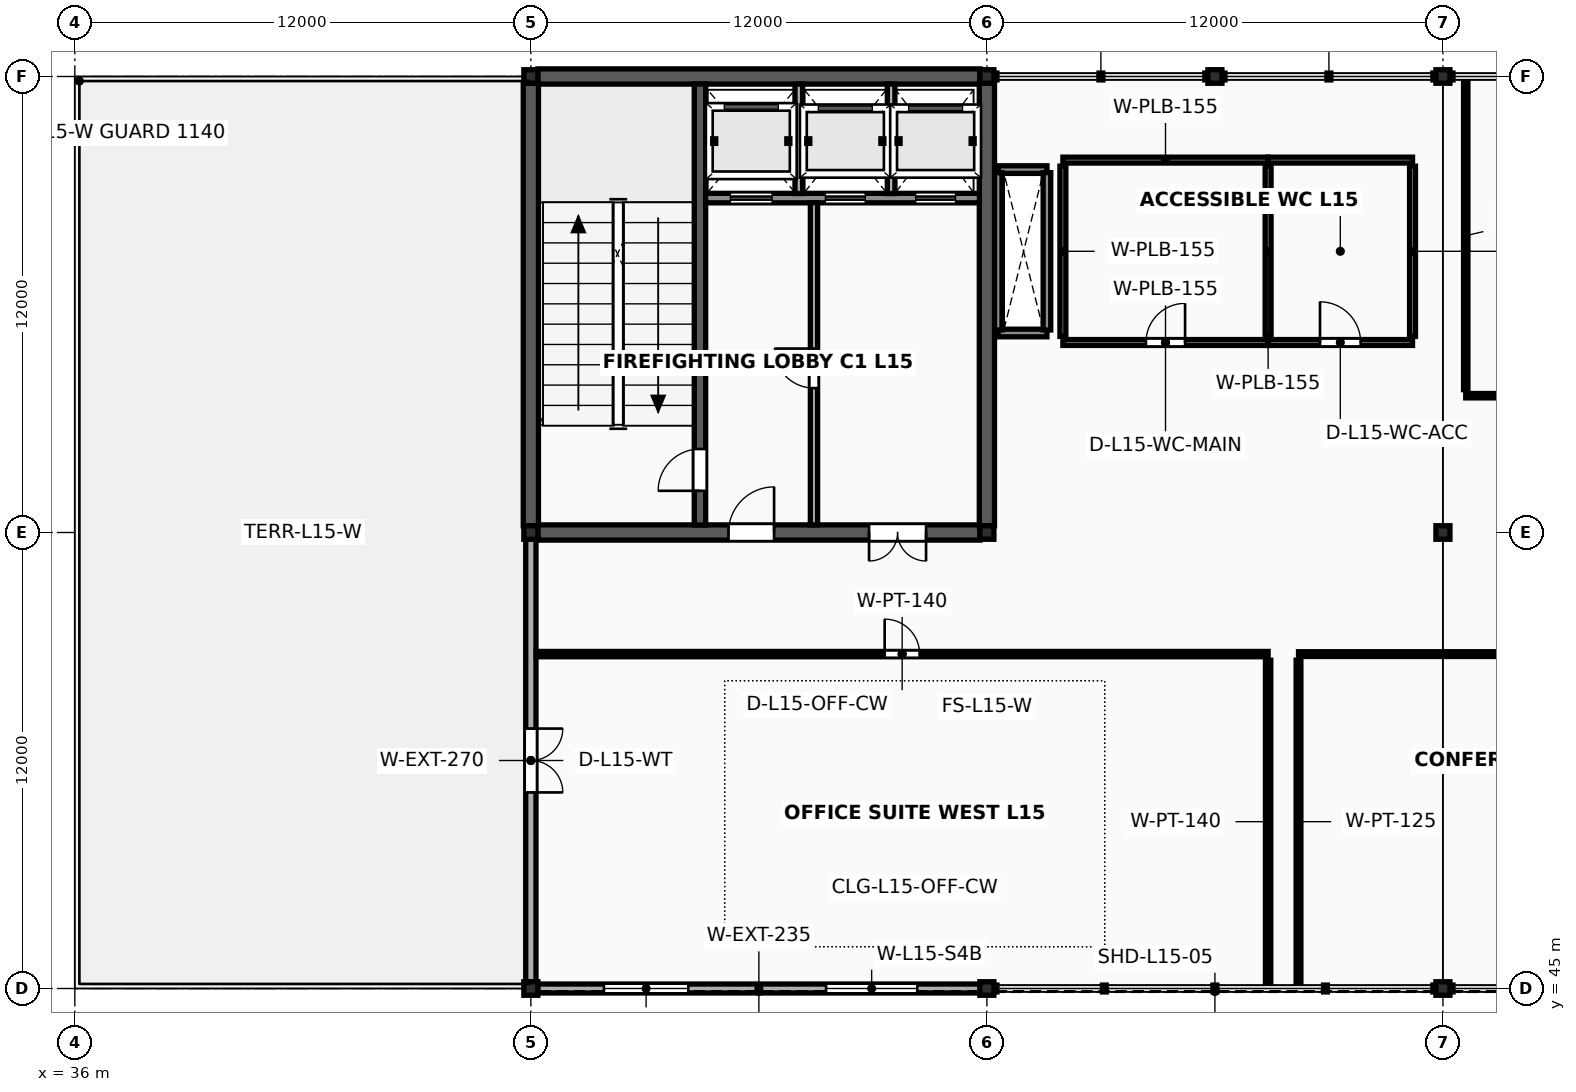
"""IFC4 building model, lengths in metres.
Left out: names, types, materials, properties, quantities, classifications, styles, units other than length and angle.
Written with IfcOpenShell. Run it as: python <this file> out.ifc"""

import sys

from ifc_helpers import new_model, si_unit, direction, frame, frame_2d, origin, origin_2d, place, context, subcontext, project, spatial, rectangle, i_section, extrude, element, fill, save


model = new_model("IFC4")
c1 = context("Model", 3, precision=1e-05, world=origin(), true_north=direction((0.0, 1.0)))
c2 = subcontext(c1, "Body", "Model", "MODEL_VIEW")
j1 = project(units=[si_unit("LENGTHUNIT", "METRE"), si_unit("PLANEANGLEUNIT", "RADIAN")], contexts=[c1])
p1 = place(None, origin())
s1 = spatial("IfcSite", under=j1, at=p1, CompositionType="ELEMENT")
p2 = place(p1, origin())
s2 = spatial("IfcBuilding", under=s1, at=p2, CompositionType="ELEMENT")
p3 = place(p2, frame((0.0, 0.0, 61.6)))
s3 = spatial("IfcBuildingStorey", under=s2, at=p3, CompositionType="ELEMENT", Elevation=61.6)
for number, where, z_axis, x_axis in (
    (1, (48.0, 45.0, 0.0), (0.0, 0.0, 1.0), (1.0, 0.0, 0.0)),
    (2, (48.0, 57.0, 0.0), (0.0, 0.0, 1.0), (1.0, 0.0, 0.0)),
    (3, (48.0, 69.0, 0.0), (0.0, 0.0, 1.0), (1.0, 0.0, 0.0)),
    (4, (60.0, 45.0, 0.0), (0.0, 0.0, 1.0), (1.0, 0.0, 0.0)),
    (5, (60.0, 57.0, 0.0), (0.0, 0.0, 1.0), (1.0, 0.0, 0.0)),
    (6, (60.0, 69.0, 0.0), (0.0, 0.0, 1.0), (1.0, 0.0, 0.0)),
    (7, (72.0, 45.0, 0.0), (0.0, 0.0, 1.0), (1.0, 0.0, 0.0)),
    (8, (72.0, 57.0, 0.0), (0.0, 0.0, 1.0), (1.0, 0.0, 0.0)),
    (9, (72.0, 69.0, 0.0), (0.0, 0.0, 1.0), (1.0, 0.0, 0.0)),
    (10, (66.0, 69.0, 0.0), (0.0, 0.0, 1.0), (1.0, 0.0, 0.0)),
):
    element("IfcColumn", number, at=place(p3, frame(where, z_axis=z_axis, x_axis=x_axis)), inside=s3, PredefinedType="COLUMN", context=c2, shape_type="SweptSolid", body=[
        extrude(i_section(OverallWidth=0.369, OverallDepth=0.356, WebThickness=0.011, FlangeThickness=0.018, FilletRadius=0.018, at=origin_2d()), origin(), (0.0, 0.0, 1.0), 4.0),
    ])
for number, where, z_axis, x_axis in (
    (11, (60.297, 62.25, 0.0), (0.0, 0.0, 1.0), (1.0, 0.0, 0.0)),
    (12, (60.297, 66.55, 0.0), (0.0, 0.0, 1.0), (1.0, 0.0, 0.0)),
):
    element("IfcWall", number, at=place(p3, frame(where, z_axis=z_axis, x_axis=x_axis)), inside=s3, PredefinedType="SOLIDWALL", context=c2, shape_type="SweptSolid", body=[
        extrude(rectangle(XDim=1.283, YDim=0.2, at=frame_2d((0.642, 0.0))), origin(), (0.0, 0.0, 1.0), 3.843),
    ])
for number, where, z_axis, x_axis in (
    (13, (60.297, 62.33, 0.0), (0.0, 0.0, 1.0), (0.0, 1.0, 0.0)),
    (14, (61.58, 62.33, 0.0), (0.0, 0.0, 1.0), (0.0, 1.0, 0.0)),
):
    element("IfcWall", number, at=place(p3, frame(where, z_axis=z_axis, x_axis=x_axis)), inside=s3, PredefinedType="SOLIDWALL", context=c2, shape_type="SweptSolid", body=[
        extrude(rectangle(XDim=4.14, YDim=0.2, at=frame_2d((2.07, 0.0))), origin(), (0.0, 0.0, 1.0), 3.843),
    ])
p4 = place(p3, frame((48.181, 57.0, 0.0), z_axis=(0.0, 0.0, 1.0), x_axis=(1.0, 0.0, 0.0)))
e15 = element("IfcWall", 15, at=p4, inside=s3, PredefinedType="SHEAR", context=c2, shape_type="SweptSolid", body=[
    extrude(rectangle(XDim=11.637, YDim=0.4, at=frame_2d((5.819, 0.0))), origin(), (0.0, 0.0, 1.0), 3.843),
])
p5 = place(p4, frame((5.019, 0.0, 0.0)))
e16 = element("IfcOpeningElement", 16, at=p5, cuts=e15, PredefinedType="OPENING", context=c2, shape_type="SweptSolid", body=[
    extrude(rectangle(XDim=1.2, YDim=2.2, at=frame_2d((0.6, 1.1))), frame((0.0, 0.215, 0.0), z_axis=(0.0, -1.0, 0.0), x_axis=(1.0, 0.0, 0.0)), (0.0, 0.0, 1.0), 0.43),
])
p6 = place(p4, frame((8.718, 0.0, 0.0)))
e17 = element("IfcOpeningElement", 17, at=p6, cuts=e15, PredefinedType="OPENING", context=c2, shape_type="SweptSolid", body=[
    extrude(rectangle(XDim=1.5, YDim=2.25, at=frame_2d((0.75, 1.125))), frame((0.0, 0.215, 0.0), z_axis=(0.0, -1.0, 0.0), x_axis=(1.0, 0.0, 0.0)), (0.0, 0.0, 1.0), 0.43),
])
p7 = place(p3, frame((48.181, 69.0, 0.0), z_axis=(0.0, 0.0, 1.0), x_axis=(1.0, 0.0, 0.0)))
e18 = element("IfcWall", 18, at=p7, inside=s3, PredefinedType="SHEAR", context=c2, shape_type="SweptSolid", body=[
    extrude(rectangle(XDim=11.637, YDim=0.4, at=frame_2d((5.819, 0.0))), origin(), (0.0, 0.0, 1.0), 3.843),
])
for number, where, z_axis, x_axis in (
    (19, (48.0, 57.175, 0.0), (0.0, 0.0, 1.0), (0.0, 1.0, 0.0)),
    (20, (60.0, 57.175, 0.0), (0.0, 0.0, 1.0), (0.0, 1.0, 0.0)),
):
    element("IfcWall", number, at=place(p3, frame(where, z_axis=z_axis, x_axis=x_axis)), inside=s3, PredefinedType="SHEAR", context=c2, shape_type="SweptSolid", body=[
        extrude(rectangle(XDim=11.65, YDim=0.4, at=frame_2d((5.825, 0.0))), origin(), (0.0, 0.0, 1.0), 3.843),
    ])
p8 = place(p3, frame((52.45, 57.197, 0.0), z_axis=(0.0, 0.0, 1.0), x_axis=(0.0, 1.0, 0.0)))
e21 = element("IfcWall", 21, at=p8, inside=s3, PredefinedType="SHEAR", context=c2, shape_type="SweptSolid", body=[
    extrude(rectangle(XDim=11.606, YDim=0.3, at=frame_2d((5.803, 0.0))), origin(), (0.0, 0.0, 1.0), 3.843),
])
p9 = place(p8, frame((0.9, 0.0, 0.0)))
e22 = element("IfcOpeningElement", 22, at=p9, cuts=e21, PredefinedType="OPENING", context=c2, shape_type="SweptSolid", body=[
    extrude(rectangle(XDim=1.1, YDim=2.2, at=frame_2d((0.55, 1.1))), frame((0.0, 0.165, 0.0), z_axis=(0.0, -1.0, 0.0), x_axis=(1.0, 0.0, 0.0)), (0.0, 0.0, 1.0), 0.33),
])
p10 = place(p3, frame((52.597, 65.8, 0.0), z_axis=(0.0, 0.0, 1.0), x_axis=(1.0, 0.0, 0.0)))
e23 = element("IfcWall", 23, at=p10, inside=s3, PredefinedType="SOLIDWALL", context=c2, shape_type="SweptSolid", body=[
    extrude(rectangle(XDim=7.206, YDim=0.25, at=frame_2d((3.603, 0.0))), origin(), (0.0, 0.0, 1.0), 3.843),
])
p11 = place(p10, frame((0.653, 0.0, 0.0)))
e24 = element("IfcOpeningElement", 24, at=p11, cuts=e23, PredefinedType="OPENING", context=c2, shape_type="SweptSolid", body=[
    extrude(rectangle(XDim=1.1, YDim=2.24, at=frame_2d((0.55, 1.12))), frame((0.0, 0.14, 0.0), z_axis=(0.0, -1.0, 0.0), x_axis=(1.0, 0.0, 0.0)), (0.0, 0.0, 1.0), 0.28),
])
p12 = place(p10, frame((3.153, 0.0, 0.0)))
e25 = element("IfcOpeningElement", 25, at=p12, cuts=e23, PredefinedType="OPENING", context=c2, shape_type="SweptSolid", body=[
    extrude(rectangle(XDim=1.05, YDim=2.2, at=frame_2d((0.525, 1.1))), frame((0.0, 0.14, 0.0), z_axis=(0.0, -1.0, 0.0), x_axis=(1.0, 0.0, 0.0)), (0.0, 0.0, 1.0), 0.28),
])
p13 = place(p10, frame((5.528, 0.0, 0.0)))
e26 = element("IfcOpeningElement", 26, at=p13, cuts=e23, PredefinedType="OPENING", context=c2, shape_type="SweptSolid", body=[
    extrude(rectangle(XDim=1.05, YDim=2.2, at=frame_2d((0.525, 1.1))), frame((0.0, 0.14, 0.0), z_axis=(0.0, -1.0, 0.0), x_axis=(1.0, 0.0, 0.0)), (0.0, 0.0, 1.0), 0.28),
])
for number, where, z_axis, x_axis in (
    (27, (55.05, 65.92, 0.0), (0.0, 0.0, 1.0), (0.0, 1.0, 0.0)),
    (28, (57.48, 65.92, 0.0), (0.0, 0.0, 1.0), (0.0, 1.0, 0.0)),
):
    element("IfcWall", number, at=place(p3, frame(where, z_axis=z_axis, x_axis=x_axis)), inside=s3, PredefinedType="SOLIDWALL", context=c2, shape_type="SweptSolid", body=[
        extrude(rectangle(XDim=2.88, YDim=0.2, at=frame_2d((1.44, 0.0))), origin(), (0.0, 0.0, 1.0), 3.833),
    ])
p14 = place(p3, frame((55.45, 57.2, 0.0), z_axis=(0.0, 0.0, 1.0), x_axis=(0.0, 1.0, 0.0)))
e29 = element("IfcWall", 29, at=p14, inside=s3, PredefinedType="SOLIDWALL", context=c2, shape_type="SweptSolid", body=[
    extrude(rectangle(XDim=8.48, YDim=0.19, at=frame_2d((4.24, 0.0))), origin(), (0.0, 0.0, 1.0), 3.833),
])
p15 = place(p14, frame((3.6, 0.0, 0.0)))
e30 = element("IfcOpeningElement", 30, at=p15, cuts=e29, PredefinedType="OPENING", context=c2, shape_type="SweptSolid", body=[
    extrude(rectangle(XDim=1.04, YDim=2.18, at=frame_2d((0.52, 1.09))), frame((0.0, 0.11, 0.0), z_axis=(0.0, -1.0, 0.0), x_axis=(1.0, 0.0, 0.0)), (0.0, 0.0, 1.0), 0.22),
])
p16 = place(p3, frame((48.183, 45.0, 0.0), z_axis=(0.0, 0.0, 1.0), x_axis=(1.0, 0.0, 0.0)))
e31 = element("IfcWall", 31, at=p16, inside=s3, PredefinedType="SOLIDWALL", context=c2, shape_type="SweptSolid", body=[
    extrude(rectangle(XDim=11.635, YDim=0.235, at=frame_2d((5.817, 0.0))), origin(), (0.0, 0.0, 1.0), 3.296),
])
p17 = place(p16, frame((1.74, 0.0, 0.78)))
e32 = element("IfcOpeningElement", 32, at=p17, cuts=e31, PredefinedType="OPENING", context=c2, shape_type="SweptSolid", body=[
    extrude(rectangle(XDim=2.22, YDim=1.74, at=frame_2d((1.11, 0.87))), frame((0.0, 0.133, 0.0), z_axis=(0.0, -1.0, 0.0), x_axis=(1.0, 0.0, 0.0)), (0.0, 0.0, 1.0), 0.265),
])
p18 = place(p16, frame((7.585, 0.0, 0.78)))
e33 = element("IfcOpeningElement", 33, at=p18, cuts=e31, PredefinedType="OPENING", context=c2, shape_type="SweptSolid", body=[
    extrude(rectangle(XDim=2.4, YDim=1.74, at=frame_2d((1.2, 0.87))), frame((0.0, 0.133, 0.0), z_axis=(0.0, -1.0, 0.0), x_axis=(1.0, 0.0, 0.0)), (0.0, 0.0, 1.0), 0.265),
])
p19 = place(p3, frame((48.0, 45.176, 0.0), z_axis=(0.0, 0.0, 1.0), x_axis=(0.0, 1.0, 0.0)))
e34 = element("IfcWall", 34, at=p19, inside=s3, PredefinedType="SOLIDWALL", context=c2, shape_type="SweptSolid", body=[
    extrude(rectangle(XDim=11.648, YDim=0.27, at=frame_2d((5.824, 0.0))), origin(), (0.0, 0.0, 1.0), 3.296),
])
p20 = place(p19, frame((4.984, 0.0, 0.0)))
e35 = element("IfcOpeningElement", 35, at=p20, cuts=e34, PredefinedType="OPENING", context=c2, shape_type="SweptSolid", body=[
    extrude(rectangle(XDim=1.68, YDim=2.34, at=frame_2d((0.84, 1.17))), frame((0.0, 0.15, 0.0), z_axis=(0.0, -1.0, 0.0), x_axis=(1.0, 0.0, 0.0)), (0.0, 0.0, 1.0), 0.3),
])
p21 = place(p3, frame((62.0, 62.0, 0.0), z_axis=(0.0, 0.0, 1.0), x_axis=(1.0, 0.0, 0.0)))
e36 = element("IfcWall", 36, at=p21, inside=s3, PredefinedType="PLUMBINGWALL", context=c2, shape_type="SweptSolid", body=[
    extrude(rectangle(XDim=5.4, YDim=0.155, at=frame_2d((2.7, 0.0))), origin(), (0.0, 0.0, 1.0), 2.88),
])
p22 = place(p21, frame((2.185, 0.0, 0.0)))
e37 = element("IfcOpeningElement", 37, at=p22, cuts=e36, PredefinedType="OPENING", context=c2, shape_type="SweptSolid", body=[
    extrude(rectangle(XDim=1.03, YDim=2.17, at=frame_2d((0.515, 1.085))), frame((0.0, 0.093, 0.0), z_axis=(0.0, -1.0, 0.0), x_axis=(1.0, 0.0, 0.0)), (0.0, 0.0, 1.0), 0.185),
])
p23 = place(p3, frame((62.0, 66.8, 0.0), z_axis=(0.0, 0.0, 1.0), x_axis=(1.0, 0.0, 0.0)))
e38 = element("IfcWall", 38, at=p23, inside=s3, PredefinedType="PLUMBINGWALL", context=c2, shape_type="SweptSolid", body=[
    extrude(rectangle(XDim=5.4, YDim=0.155, at=frame_2d((2.7, 0.0))), origin(), (0.0, 0.0, 1.0), 2.88),
])
for number, where, z_axis, x_axis in (
    (39, (62.0, 62.16, 0.0), (0.0, 0.0, 1.0), (0.0, 1.0, 0.0)),
    (40, (67.4, 62.16, 0.0), (0.0, 0.0, 1.0), (0.0, 1.0, 0.0)),
):
    element("IfcWall", number, at=place(p3, frame(where, z_axis=z_axis, x_axis=x_axis)), inside=s3, PredefinedType="PLUMBINGWALL", context=c2, shape_type="SweptSolid", body=[
        extrude(rectangle(XDim=4.48, YDim=0.155, at=frame_2d((2.24, 0.0))), origin(), (0.0, 0.0, 1.0), 2.88),
    ])
p24 = place(p3, frame((67.4, 62.0, 0.0), z_axis=(0.0, 0.0, 1.0), x_axis=(1.0, 0.0, 0.0)))
e41 = element("IfcWall", 41, at=p24, inside=s3, PredefinedType="PLUMBINGWALL", context=c2, shape_type="SweptSolid", body=[
    extrude(rectangle(XDim=3.8, YDim=0.155, at=frame_2d((1.9, 0.0))), origin(), (0.0, 0.0, 1.0), 2.88),
])
p25 = place(p24, frame((1.365, 0.0, 0.0)))
e42 = element("IfcOpeningElement", 42, at=p25, cuts=e41, PredefinedType="OPENING", context=c2, shape_type="SweptSolid", body=[
    extrude(rectangle(XDim=1.07, YDim=2.19, at=frame_2d((0.535, 1.095))), frame((0.0, 0.093, 0.0), z_axis=(0.0, -1.0, 0.0), x_axis=(1.0, 0.0, 0.0)), (0.0, 0.0, 1.0), 0.185),
])
p26 = place(p3, frame((67.4, 66.8, 0.0), z_axis=(0.0, 0.0, 1.0), x_axis=(1.0, 0.0, 0.0)))
e43 = element("IfcWall", 43, at=p26, inside=s3, PredefinedType="PLUMBINGWALL", context=c2, shape_type="SweptSolid", body=[
    extrude(rectangle(XDim=3.8, YDim=0.155, at=frame_2d((1.9, 0.0))), origin(), (0.0, 0.0, 1.0), 2.88),
])
p27 = place(p3, frame((71.2, 62.16, 0.0), z_axis=(0.0, 0.0, 1.0), x_axis=(0.0, 1.0, 0.0)))
e44 = element("IfcWall", 44, at=p27, inside=s3, PredefinedType="PLUMBINGWALL", context=c2, shape_type="SweptSolid", body=[
    extrude(rectangle(XDim=4.48, YDim=0.155, at=frame_2d((2.24, 0.0))), origin(), (0.0, 0.0, 1.0), 2.88),
])
p28 = place(p3, frame((48.14, 53.8, 0.0), z_axis=(0.0, 0.0, 1.0), x_axis=(1.0, 0.0, 0.0)))
e45 = element("IfcWall", 45, at=p28, inside=s3, PredefinedType="PARTITIONING", context=c2, shape_type="SweptSolid", body=[
    extrude(rectangle(XDim=19.26, YDim=0.14, at=frame_2d((9.63, 0.0))), origin(), (0.0, 0.0, 1.0), 2.88),
])
p29 = place(p28, frame((9.17, 0.0, 0.0)))
e46 = element("IfcOpeningElement", 46, at=p29, cuts=e45, PredefinedType="OPENING", context=c2, shape_type="SweptSolid", body=[
    extrude(rectangle(XDim=0.92, YDim=2.1, at=frame_2d((0.46, 1.05))), frame((0.0, 0.085, 0.0), z_axis=(0.0, -1.0, 0.0), x_axis=(1.0, 0.0, 0.0)), (0.0, 0.0, 1.0), 0.17),
])
p30 = place(p3, frame((67.4, 45.14, 0.0), z_axis=(0.0, 0.0, 1.0), x_axis=(0.0, 1.0, 0.0)))
e47 = element("IfcWall", 47, at=p30, inside=s3, PredefinedType="PARTITIONING", context=c2, shape_type="SweptSolid", body=[
    extrude(rectangle(XDim=8.5, YDim=0.14, at=frame_2d((4.25, 0.0))), origin(), (0.0, 0.0, 1.0), 2.88),
])
p31 = place(p3, frame((68.2, 53.8, 0.0), z_axis=(0.0, 0.0, 1.0), x_axis=(1.0, 0.0, 0.0)))
e48 = element("IfcWall", 48, at=p31, inside=s3, PredefinedType="PARTITIONING", context=c2, shape_type="SweptSolid", body=[
    extrude(rectangle(XDim=15.2, YDim=0.125, at=frame_2d((7.6, 0.0))), origin(), (0.0, 0.0, 1.0), 2.88),
])
p32 = place(p31, frame((6.855, 0.0, 0.0)))
e49 = element("IfcOpeningElement", 49, at=p32, cuts=e48, PredefinedType="OPENING", context=c2, shape_type="SweptSolid", body=[
    extrude(rectangle(XDim=1.49, YDim=2.28, at=frame_2d((0.745, 1.14))), frame((0.0, 0.077, 0.0), z_axis=(0.0, -1.0, 0.0), x_axis=(1.0, 0.0, 0.0)), (0.0, 0.0, 1.0), 0.155),
])
p33 = place(p3, frame((68.2, 45.14, 0.0), z_axis=(0.0, 0.0, 1.0), x_axis=(0.0, 1.0, 0.0)))
e50 = element("IfcWall", 50, at=p33, inside=s3, PredefinedType="PARTITIONING", context=c2, shape_type="SweptSolid", body=[
    extrude(rectangle(XDim=8.5, YDim=0.125, at=frame_2d((4.25, 0.0))), origin(), (0.0, 0.0, 1.0), 2.88),
])
p34 = place(p3, frame((72.6, 60.6, 0.0), z_axis=(0.0, 0.0, 1.0), x_axis=(1.0, 0.0, 0.0)))
e51 = element("IfcWall", 51, at=p34, inside=s3, PredefinedType="PARTITIONING", context=c2, shape_type="SweptSolid", body=[
    extrude(rectangle(XDim=34.8, YDim=0.115, at=frame_2d((17.4, 0.0))), origin(), (0.0, 0.0, 1.0), 2.88),
])
p35 = place(p34, frame((16.565, 0.0, 0.0)))
e52 = element("IfcOpeningElement", 52, at=p35, cuts=e51, PredefinedType="OPENING", context=c2, shape_type="SweptSolid", body=[
    extrude(rectangle(XDim=1.67, YDim=2.35, at=frame_2d((0.835, 1.175))), frame((0.0, 0.073, 0.0), z_axis=(0.0, -1.0, 0.0), x_axis=(1.0, 0.0, 0.0)), (0.0, 0.0, 1.0), 0.145),
])
p36 = place(p3, frame((72.6, 60.76, 0.0), z_axis=(0.0, 0.0, 1.0), x_axis=(0.0, 1.0, 0.0)))
e53 = element("IfcWall", 53, at=p36, inside=s3, PredefinedType="PARTITIONING", context=c2, shape_type="SweptSolid", body=[
    extrude(rectangle(XDim=8.1, YDim=0.115, at=frame_2d((4.05, 0.0))), origin(), (0.0, 0.0, 1.0), 2.88),
])
p37 = place(p17, origin())
e54 = element("IfcWindow", 54, at=p37, inside=s3, PartitioningType="DOUBLE_PANEL_VERTICAL", PredefinedType="WINDOW", context=c2, shape_type="SweptSolid", body=[
    extrude(rectangle(XDim=2.22, YDim=1.74, at=frame_2d((1.11, 0.87))), frame((0.0, 0.03, 0.0), z_axis=(0.0, -1.0, 0.0), x_axis=(1.0, 0.0, 0.0)), (0.0, 0.0, 1.0), 0.06),
])
fill(e32, e54)
p38 = place(p18, origin())
e55 = element("IfcWindow", 55, at=p38, inside=s3, PartitioningType="DOUBLE_PANEL_VERTICAL", PredefinedType="WINDOW", context=c2, shape_type="SweptSolid", body=[
    extrude(rectangle(XDim=2.4, YDim=1.74, at=frame_2d((1.2, 0.87))), frame((0.0, 0.03, 0.0), z_axis=(0.0, -1.0, 0.0), x_axis=(1.0, 0.0, 0.0)), (0.0, 0.0, 1.0), 0.06),
])
fill(e33, e55)
p39 = place(p20, origin())
e56 = element("IfcDoor", 56, at=p39, inside=s3, OperationType="DOUBLE_DOOR_SINGLE_SWING", PredefinedType="DOOR", context=c2, shape_type="SweptSolid", body=[
    extrude(rectangle(XDim=1.68, YDim=2.34, at=frame_2d((0.84, 1.17))), frame((0.0, 0.025, 0.0), z_axis=(0.0, -1.0, 0.0), x_axis=(1.0, 0.0, 0.0)), (0.0, 0.0, 1.0), 0.05),
])
fill(e35, e56)
p40 = place(p9, origin())
e57 = element("IfcDoor", 57, at=p40, inside=s3, OperationType="SINGLE_SWING_LEFT", PredefinedType="DOOR", context=c2, shape_type="SweptSolid", body=[
    extrude(rectangle(XDim=1.1, YDim=2.2, at=frame_2d((0.55, 1.1))), frame((0.0, 0.025, 0.0), z_axis=(0.0, -1.0, 0.0), x_axis=(1.0, 0.0, 0.0)), (0.0, 0.0, 1.0), 0.05),
])
fill(e22, e57)
p41 = place(p15, origin())
e58 = element("IfcDoor", 58, at=p41, inside=s3, OperationType="SINGLE_SWING_RIGHT", PredefinedType="DOOR", context=c2, shape_type="SweptSolid", body=[
    extrude(rectangle(XDim=1.04, YDim=2.18, at=frame_2d((0.52, 1.09))), frame((0.0, 0.025, 0.0), z_axis=(0.0, -1.0, 0.0), x_axis=(1.0, 0.0, 0.0)), (0.0, 0.0, 1.0), 0.05),
])
fill(e30, e58)
p42 = place(p5, origin())
e59 = element("IfcDoor", 59, at=p42, inside=s3, OperationType="SINGLE_SWING_RIGHT", PredefinedType="DOOR", context=c2, shape_type="SweptSolid", body=[
    extrude(rectangle(XDim=1.2, YDim=2.2, at=frame_2d((0.6, 1.1))), frame((0.0, 0.025, 0.0), z_axis=(0.0, -1.0, 0.0), x_axis=(1.0, 0.0, 0.0)), (0.0, 0.0, 1.0), 0.05),
])
fill(e16, e59)
p43 = place(p6, origin())
e60 = element("IfcDoor", 60, at=p43, inside=s3, OperationType="DOUBLE_DOOR_SINGLE_SWING", PredefinedType="DOOR", context=c2, shape_type="SweptSolid", body=[
    extrude(rectangle(XDim=1.5, YDim=2.25, at=frame_2d((0.75, 1.125))), frame((0.0, 0.025, 0.0), z_axis=(0.0, -1.0, 0.0), x_axis=(1.0, 0.0, 0.0)), (0.0, 0.0, 1.0), 0.05),
])
fill(e17, e60)
p44 = place(p11, origin())
e61 = element("IfcDoor", 61, at=p44, inside=s3, OperationType="SLIDING_TO_LEFT", PredefinedType="USERDEFINED", context=c2, shape_type="SweptSolid", body=[
    extrude(rectangle(XDim=1.1, YDim=2.24, at=frame_2d((0.55, 1.12))), frame((0.0, 0.025, 0.0), z_axis=(0.0, -1.0, 0.0), x_axis=(1.0, 0.0, 0.0)), (0.0, 0.0, 1.0), 0.05),
])
fill(e24, e61)
p45 = place(p12, origin())
e62 = element("IfcDoor", 62, at=p45, inside=s3, OperationType="SLIDING_TO_LEFT", PredefinedType="USERDEFINED", context=c2, shape_type="SweptSolid", body=[
    extrude(rectangle(XDim=1.05, YDim=2.2, at=frame_2d((0.525, 1.1))), frame((0.0, 0.025, 0.0), z_axis=(0.0, -1.0, 0.0), x_axis=(1.0, 0.0, 0.0)), (0.0, 0.0, 1.0), 0.05),
])
fill(e25, e62)
p46 = place(p13, origin())
e63 = element("IfcDoor", 63, at=p46, inside=s3, OperationType="SLIDING_TO_LEFT", PredefinedType="USERDEFINED", context=c2, shape_type="SweptSolid", body=[
    extrude(rectangle(XDim=1.05, YDim=2.2, at=frame_2d((0.525, 1.1))), frame((0.0, 0.025, 0.0), z_axis=(0.0, -1.0, 0.0), x_axis=(1.0, 0.0, 0.0)), (0.0, 0.0, 1.0), 0.05),
])
fill(e26, e63)
p47 = place(p22, origin())
e64 = element("IfcDoor", 64, at=p47, inside=s3, OperationType="SINGLE_SWING_RIGHT", PredefinedType="DOOR", context=c2, shape_type="SweptSolid", body=[
    extrude(rectangle(XDim=1.03, YDim=2.17, at=frame_2d((0.515, 1.085))), frame((0.0, 0.025, 0.0), z_axis=(0.0, -1.0, 0.0), x_axis=(1.0, 0.0, 0.0)), (0.0, 0.0, 1.0), 0.05),
])
fill(e37, e64)
p48 = place(p25, origin())
e65 = element("IfcDoor", 65, at=p48, inside=s3, OperationType="SINGLE_SWING_LEFT", PredefinedType="DOOR", context=c2, shape_type="SweptSolid", body=[
    extrude(rectangle(XDim=1.07, YDim=2.19, at=frame_2d((0.535, 1.095))), frame((0.0, 0.025, 0.0), z_axis=(0.0, -1.0, 0.0), x_axis=(1.0, 0.0, 0.0)), (0.0, 0.0, 1.0), 0.05),
])
fill(e42, e65)
p49 = place(p29, origin())
e66 = element("IfcDoor", 66, at=p49, inside=s3, OperationType="SINGLE_SWING_LEFT", PredefinedType="DOOR", context=c2, shape_type="SweptSolid", body=[
    extrude(rectangle(XDim=0.92, YDim=2.1, at=frame_2d((0.46, 1.05))), frame((0.0, 0.025, 0.0), z_axis=(0.0, -1.0, 0.0), x_axis=(1.0, 0.0, 0.0)), (0.0, 0.0, 1.0), 0.05),
])
fill(e46, e66)
save(model, sys.argv[1])
